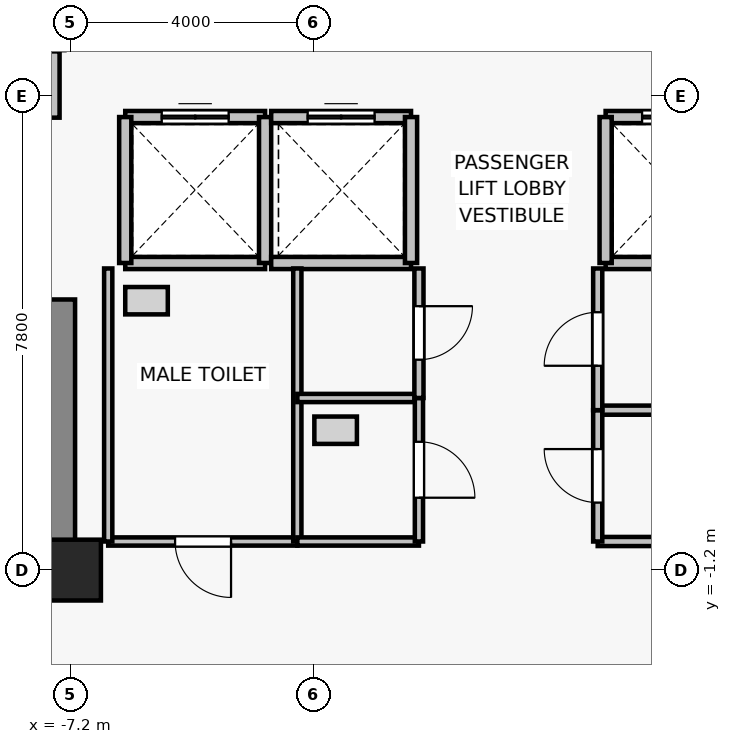
"""IFC4 building model, lengths in metres.
Left out: names, types, materials, properties, quantities, classifications, styles, units other than length and angle.
Written with IfcOpenShell. Run it as: python <this file> out.ifc"""

import sys

from ifc_helpers import new_model, si_unit, direction, frame, frame_2d, origin, origin_2d, place, context, subcontext, project, spatial, rectangle, extrude, source, transform, mapped, element, fill, save


model = new_model("IFC4")
c1 = context("Model", 3, precision=1e-05, world=origin(), true_north=direction((0.0, 1.0)))
c2 = subcontext(c1, "Body", "Model", "MODEL_VIEW")
j1 = project(units=[si_unit("LENGTHUNIT", "METRE"), si_unit("PLANEANGLEUNIT", "RADIAN")], contexts=[c1])
p1 = place(None, origin())
s1 = spatial("IfcSite", under=j1, at=p1, CompositionType="ELEMENT")
p2 = place(p1, origin())
s2 = spatial("IfcBuilding", under=s1, at=p2, CompositionType="ELEMENT")
p3 = place(p2, frame((0.0, 0.0, 195.7)))
s3 = spatial("IfcBuildingStorey", under=s2, at=p3, CompositionType="ELEMENT", Elevation=195.7)
p4 = place(p3, frame((-7.2, -1.2, 0.0), z_axis=(0.0, 0.0, 1.0), x_axis=(1.0, 0.0, 0.0)))
e1 = element("IfcColumn", 1, at=p4, inside=s3, PredefinedType="COLUMN", context=c2, shape_type="SweptSolid", body=[
    extrude(rectangle(XDim=1.0, YDim=1.0, at=origin_2d()), origin(), (0.0, 0.0, 1.0), 3.3),
])
p5 = place(p3, frame((-7.4, -0.825, 0.0), z_axis=(0.0, 0.0, 1.0), x_axis=(0.0, 1.0, 0.0)))
e2 = element("IfcWall", 2, at=p5, inside=s3, PredefinedType="SHEAR", context=c2, shape_type="SweptSolid", body=[
    extrude(rectangle(XDim=4.075, YDim=0.55, at=frame_2d((2.038, 0.0))), origin(), (0.0, 0.0, 1.0), 3.05),
])
p6 = place(p3, frame((-4.0, 3.85, 0.0), z_axis=(0.0, 0.0, 1.0), x_axis=(-1.0, 0.0, 0.0)))
e3 = element("IfcWall", 3, at=p6, inside=s3, PredefinedType="SOLIDWALL", context=c2, shape_type="SweptSolid", body=[
    extrude(rectangle(XDim=2.3, YDim=0.2, at=frame_2d((1.15, 0.0))), origin(), (0.0, 0.0, 1.0), 3.05),
])
p7 = place(p3, frame((-6.3, 6.25, 0.0), z_axis=(0.0, 0.0, 1.0), x_axis=(1.0, 0.0, 0.0)))
e4 = element("IfcWall", 4, at=p7, inside=s3, PredefinedType="SOLIDWALL", context=c2, shape_type="SweptSolid", body=[
    extrude(rectangle(XDim=2.3, YDim=0.2, at=frame_2d((1.15, 0.0))), origin(), (0.0, 0.0, 1.0), 3.05),
])
p8 = place(p7, frame((0.6, 0.0, 0.0)))
e5 = element("IfcOpeningElement", 5, at=p8, cuts=e4, PredefinedType="OPENING", context=c2, shape_type="SweptSolid", body=[
    extrude(rectangle(XDim=1.1, YDim=2.2, at=frame_2d((0.55, 1.1))), frame((0.0, 0.11, 0.0), z_axis=(0.0, -1.0, 0.0), x_axis=(1.0, 0.0, 0.0)), (0.0, 0.0, 1.0), 0.22),
])
for number, where, z_axis, x_axis in (
    (6, (-6.3, 3.85, 0.0), (0.0, 0.0, 1.0), (0.0, 1.0, 0.0)),
    (7, (-4.0, 6.25, 0.0), (0.0, 0.0, 1.0), (0.0, -1.0, 0.0)),
):
    element("IfcWall", number, at=place(p3, frame(where, z_axis=z_axis, x_axis=x_axis)), inside=s3, PredefinedType="SOLIDWALL", context=c2, shape_type="SweptSolid", body=[
        extrude(rectangle(XDim=2.4, YDim=0.2, at=frame_2d((1.2, 0.0))), origin(), (0.0, 0.0, 1.0), 3.05),
    ])
p9 = place(p3, frame((-1.6, 3.85, 0.0), z_axis=(0.0, 0.0, 1.0), x_axis=(-1.0, 0.0, 0.0)))
e8 = element("IfcWall", 8, at=p9, inside=s3, PredefinedType="SOLIDWALL", context=c2, shape_type="SweptSolid", body=[
    extrude(rectangle(XDim=2.3, YDim=0.2, at=frame_2d((1.15, 0.0))), origin(), (0.0, 0.0, 1.0), 3.05),
])
p10 = place(p3, frame((-3.9, 6.25, 0.0), z_axis=(0.0, 0.0, 1.0), x_axis=(1.0, 0.0, 0.0)))
e9 = element("IfcWall", 9, at=p10, inside=s3, PredefinedType="SOLIDWALL", context=c2, shape_type="SweptSolid", body=[
    extrude(rectangle(XDim=2.3, YDim=0.2, at=frame_2d((1.15, 0.0))), origin(), (0.0, 0.0, 1.0), 3.05),
])
p11 = place(p10, frame((0.6, 0.0, 0.0)))
e10 = element("IfcOpeningElement", 10, at=p11, cuts=e9, PredefinedType="OPENING", context=c2, shape_type="SweptSolid", body=[
    extrude(rectangle(XDim=1.1, YDim=2.2, at=frame_2d((0.55, 1.1))), frame((0.0, 0.11, 0.0), z_axis=(0.0, -1.0, 0.0), x_axis=(1.0, 0.0, 0.0)), (0.0, 0.0, 1.0), 0.22),
])
p12 = place(p3, frame((-1.6, 6.25, 0.0), z_axis=(0.0, 0.0, 1.0), x_axis=(0.0, -1.0, 0.0)))
e11 = element("IfcWall", 11, at=p12, inside=s3, PredefinedType="SOLIDWALL", context=c2, shape_type="SweptSolid", body=[
    extrude(rectangle(XDim=2.4, YDim=0.2, at=frame_2d((1.2, 0.0))), origin(), (0.0, 0.0, 1.0), 3.05),
])
p13 = place(p3, frame((3.9, 3.85, 0.0), z_axis=(0.0, 0.0, 1.0), x_axis=(-1.0, 0.0, 0.0)))
e12 = element("IfcWall", 12, at=p13, inside=s3, PredefinedType="SOLIDWALL", context=c2, shape_type="SweptSolid", body=[
    extrude(rectangle(XDim=2.3, YDim=0.2, at=frame_2d((1.15, 0.0))), origin(), (0.0, 0.0, 1.0), 3.05),
])
p14 = place(p3, frame((1.6, 6.25, 0.0), z_axis=(0.0, 0.0, 1.0), x_axis=(1.0, 0.0, 0.0)))
e13 = element("IfcWall", 13, at=p14, inside=s3, PredefinedType="SOLIDWALL", context=c2, shape_type="SweptSolid", body=[
    extrude(rectangle(XDim=2.3, YDim=0.2, at=frame_2d((1.15, 0.0))), origin(), (0.0, 0.0, 1.0), 3.05),
])
p15 = place(p14, frame((0.6, 0.0, 0.0)))
e14 = element("IfcOpeningElement", 14, at=p15, cuts=e13, PredefinedType="OPENING", context=c2, shape_type="SweptSolid", body=[
    extrude(rectangle(XDim=1.1, YDim=2.2, at=frame_2d((0.55, 1.1))), frame((0.0, 0.11, 0.0), z_axis=(0.0, -1.0, 0.0), x_axis=(1.0, 0.0, 0.0)), (0.0, 0.0, 1.0), 0.22),
])
p16 = place(p3, frame((1.6, 3.85, 0.0), z_axis=(0.0, 0.0, 1.0), x_axis=(0.0, 1.0, 0.0)))
e15 = element("IfcWall", 15, at=p16, inside=s3, PredefinedType="SOLIDWALL", context=c2, shape_type="SweptSolid", body=[
    extrude(rectangle(XDim=2.4, YDim=0.2, at=frame_2d((1.2, 0.0))), origin(), (0.0, 0.0, 1.0), 3.05),
])
p17 = place(p3, frame((-7.4, 7.35, 0.0), z_axis=(0.0, 0.0, 1.0), x_axis=(-1.0, 0.0, 0.0)))
e16 = element("IfcWall", 16, at=p17, inside=s3, PredefinedType="SOLIDWALL", context=c2, shape_type="SweptSolid", body=[
    extrude(rectangle(XDim=2.2, YDim=0.2, at=frame_2d((1.1, 0.0))), origin(), (0.0, 0.0, 1.0), 2.54),
])
p18 = place(p3, frame((-7.47, 7.33, 0.0), z_axis=(0.0, 0.0, 1.0), x_axis=(0.0, -1.0, 0.0)))
e17 = element("IfcWall", 17, at=p18, inside=s3, PredefinedType="PARTITIONING", context=c2, shape_type="SweptSolid", body=[
    extrude(rectangle(XDim=1.09, YDim=0.18, at=frame_2d((0.545, 0.0))), origin(), (0.0, 0.0, 1.0), 2.54),
])
p19 = place(p3, frame((-3.47, -0.73, 0.0), z_axis=(0.0, 0.0, 1.0), x_axis=(-1.0, 0.0, 0.0)))
e18 = element("IfcWall", 18, at=p19, inside=s3, PredefinedType="PARTITIONING", context=c2, shape_type="SweptSolid", body=[
    extrude(rectangle(XDim=3.11, YDim=0.135, at=frame_2d((1.555, 0.0))), origin(), (0.0, 0.0, 1.0), 3.05),
])
p20 = place(p19, frame((1.09, 0.0, 0.0)))
e19 = element("IfcOpeningElement", 19, at=p20, cuts=e18, PredefinedType="OPENING", context=c2, shape_type="SweptSolid", body=[
    extrude(rectangle(XDim=0.92, YDim=2.1, at=frame_2d((0.46, 1.05))), frame((0.0, 0.077, 0.0), z_axis=(0.0, -1.0, 0.0), x_axis=(1.0, 0.0, 0.0)), (0.0, 0.0, 1.0), 0.155),
])
for number, where, z_axis, x_axis in (
    (20, (-6.58, -0.73, 0.0), (0.0, 0.0, 1.0), (0.0, 1.0, 0.0)),
    (21, (-3.47, 3.76, 0.0), (0.0, 0.0, 1.0), (0.0, -1.0, 0.0)),
):
    element("IfcWall", number, at=place(p3, frame(where, z_axis=z_axis, x_axis=x_axis)), inside=s3, PredefinedType="PARTITIONING", context=c2, shape_type="SweptSolid", body=[
        extrude(rectangle(XDim=4.49, YDim=0.135, at=frame_2d((2.245, 0.0))), origin(), (0.0, 0.0, 1.0), 3.05),
    ])
for number, where, z_axis, x_axis in (
    (22, (-1.47, -0.73, 0.0), (0.0, 0.0, 1.0), (-1.0, 0.0, 0.0)),
    (23, (-3.47, 1.63, 0.0), (0.0, 0.0, 1.0), (1.0, 0.0, 0.0)),
):
    element("IfcWall", number, at=place(p3, frame(where, z_axis=z_axis, x_axis=x_axis)), inside=s3, PredefinedType="PARTITIONING", context=c2, shape_type="SweptSolid", body=[
        extrude(rectangle(XDim=2.0, YDim=0.135, at=frame_2d((1.0, 0.0))), origin(), (0.0, 0.0, 1.0), 3.05),
    ])
p21 = place(p3, frame((-1.47, 1.63, 0.0), z_axis=(0.0, 0.0, 1.0), x_axis=(0.0, -1.0, 0.0)))
e24 = element("IfcWall", 24, at=p21, inside=s3, PredefinedType="PARTITIONING", context=c2, shape_type="SweptSolid", body=[
    extrude(rectangle(XDim=2.36, YDim=0.135, at=frame_2d((1.18, 0.0))), origin(), (0.0, 0.0, 1.0), 3.05),
])
p22 = place(p21, frame((0.72, 0.0, 0.0)))
e25 = element("IfcOpeningElement", 25, at=p22, cuts=e24, PredefinedType="OPENING", context=c2, shape_type="SweptSolid", body=[
    extrude(rectangle(XDim=0.92, YDim=2.1, at=frame_2d((0.46, 1.05))), frame((0.0, 0.077, 0.0), z_axis=(0.0, -1.0, 0.0), x_axis=(1.0, 0.0, 0.0)), (0.0, 0.0, 1.0), 0.155),
])
p23 = place(p3, frame((-1.47, 3.76, 0.0), z_axis=(0.0, 0.0, 1.0), x_axis=(0.0, -1.0, 0.0)))
e26 = element("IfcWall", 26, at=p23, inside=s3, PredefinedType="PARTITIONING", context=c2, shape_type="SweptSolid", body=[
    extrude(rectangle(XDim=2.13, YDim=0.15, at=frame_2d((1.065, 0.0))), origin(), (0.0, 0.0, 1.0), 3.05),
])
p24 = place(p23, frame((0.62, 0.0, 0.0)))
e27 = element("IfcOpeningElement", 27, at=p24, cuts=e26, PredefinedType="OPENING", context=c2, shape_type="SweptSolid", body=[
    extrude(rectangle(XDim=0.88, YDim=2.1, at=frame_2d((0.44, 1.05))), frame((0.0, 0.085, 0.0), z_axis=(0.0, -1.0, 0.0), x_axis=(1.0, 0.0, 0.0)), (0.0, 0.0, 1.0), 0.17),
])
for number, where, z_axis, x_axis in (
    (28, (3.68, -0.73, 0.0), (0.0, 0.0, 1.0), (-1.0, 0.0, 0.0)),
    (29, (1.47, 1.43, 0.0), (0.0, 0.0, 1.0), (1.0, 0.0, 0.0)),
):
    element("IfcWall", number, at=place(p3, frame(where, z_axis=z_axis, x_axis=x_axis)), inside=s3, PredefinedType="PARTITIONING", context=c2, shape_type="SweptSolid", body=[
        extrude(rectangle(XDim=2.21, YDim=0.15, at=frame_2d((1.105, 0.0))), origin(), (0.0, 0.0, 1.0), 3.05),
    ])
p25 = place(p3, frame((1.47, -0.73, 0.0), z_axis=(0.0, 0.0, 1.0), x_axis=(0.0, 1.0, 0.0)))
e30 = element("IfcWall", 30, at=p25, inside=s3, PredefinedType="PARTITIONING", context=c2, shape_type="SweptSolid", body=[
    extrude(rectangle(XDim=2.16, YDim=0.15, at=frame_2d((1.08, 0.0))), origin(), (0.0, 0.0, 1.0), 3.05),
])
p26 = place(p25, frame((0.64, 0.0, 0.0)))
e31 = element("IfcOpeningElement", 31, at=p26, cuts=e30, PredefinedType="OPENING", context=c2, shape_type="SweptSolid", body=[
    extrude(rectangle(XDim=0.88, YDim=2.1, at=frame_2d((0.44, 1.05))), frame((0.0, 0.085, 0.0), z_axis=(0.0, -1.0, 0.0), x_axis=(1.0, 0.0, 0.0)), (0.0, 0.0, 1.0), 0.17),
])
p27 = place(p3, frame((1.47, 1.43, 0.0), z_axis=(0.0, 0.0, 1.0), x_axis=(0.0, 1.0, 0.0)))
e32 = element("IfcWall", 32, at=p27, inside=s3, PredefinedType="PARTITIONING", context=c2, shape_type="SweptSolid", body=[
    extrude(rectangle(XDim=2.33, YDim=0.15, at=frame_2d((1.165, 0.0))), origin(), (0.0, 0.0, 1.0), 3.05),
])
p28 = place(p27, frame((0.73, 0.0, 0.0)))
e33 = element("IfcOpeningElement", 33, at=p28, cuts=e32, PredefinedType="OPENING", context=c2, shape_type="SweptSolid", body=[
    extrude(rectangle(XDim=0.88, YDim=2.15, at=frame_2d((0.44, 1.075))), frame((0.0, 0.085, 0.0), z_axis=(0.0, -1.0, 0.0), x_axis=(1.0, 0.0, 0.0)), (0.0, 0.0, 1.0), 0.17),
])
m1 = source(origin(), c2, "Body", "SweptSolid", [
    extrude(rectangle(XDim=1.1, YDim=2.2, at=frame_2d((0.55, 1.1))), frame((0.0, 0.025, 0.0), z_axis=(0.0, -1.0, 0.0), x_axis=(1.0, 0.0, 0.0)), (0.0, 0.0, 1.0), 0.05),
])
p29 = place(p8, origin())
e34 = element("IfcDoor", 34, at=p29, inside=s3, OperationType="DOUBLE_DOOR_SLIDING", PredefinedType="DOOR", context=c2, shape_type="MappedRepresentation", body=[
    mapped(m1, transform((0.0, 0.0, 0.0), x_axis=(1.0, 0.0, 0.0), y_axis=(0.0, 1.0, 0.0), z_axis=(0.0, 0.0, 1.0), scale=1.0)),
])
fill(e5, e34)
p30 = place(p11, origin())
e35 = element("IfcDoor", 35, at=p30, inside=s3, OperationType="DOUBLE_DOOR_SLIDING", PredefinedType="DOOR", context=c2, shape_type="MappedRepresentation", body=[
    mapped(m1, transform((0.0, 0.0, 0.0), x_axis=(1.0, 0.0, 0.0), y_axis=(0.0, 1.0, 0.0), z_axis=(0.0, 0.0, 1.0), scale=1.0)),
])
fill(e10, e35)
p31 = place(p15, origin())
e36 = element("IfcDoor", 36, at=p31, inside=s3, OperationType="DOUBLE_DOOR_SLIDING", PredefinedType="DOOR", context=c2, shape_type="MappedRepresentation", body=[
    mapped(m1, transform((0.0, 0.0, 0.0), x_axis=(1.0, 0.0, 0.0), y_axis=(0.0, 1.0, 0.0), z_axis=(0.0, 0.0, 1.0), scale=1.0)),
])
fill(e14, e36)
m2 = source(origin(), c2, "Body", "SweptSolid", [
    extrude(rectangle(XDim=0.92, YDim=2.1, at=frame_2d((0.46, 1.05))), frame((0.0, 0.025, 0.0), z_axis=(0.0, -1.0, 0.0), x_axis=(1.0, 0.0, 0.0)), (0.0, 0.0, 1.0), 0.05),
])
p32 = place(p20, origin())
e37 = element("IfcDoor", 37, at=p32, inside=s3, OperationType="SINGLE_SWING_LEFT", PredefinedType="DOOR", context=c2, shape_type="MappedRepresentation", body=[
    mapped(m2, transform((0.0, 0.0, 0.0), x_axis=(1.0, 0.0, 0.0), y_axis=(0.0, 1.0, 0.0), z_axis=(0.0, 0.0, 1.0), scale=1.0)),
])
fill(e19, e37)
p33 = place(p22, origin())
e38 = element("IfcDoor", 38, at=p33, inside=s3, OperationType="SINGLE_SWING_RIGHT", PredefinedType="DOOR", context=c2, shape_type="MappedRepresentation", body=[
    mapped(m2, transform((0.0, 0.0, 0.0), x_axis=(1.0, 0.0, 0.0), y_axis=(0.0, 1.0, 0.0), z_axis=(0.0, 0.0, 1.0), scale=1.0)),
])
fill(e25, e38)
m3 = source(origin(), c2, "Body", "SweptSolid", [
    extrude(rectangle(XDim=0.88, YDim=2.1, at=frame_2d((0.44, 1.05))), frame((0.0, 0.025, 0.0), z_axis=(0.0, -1.0, 0.0), x_axis=(1.0, 0.0, 0.0)), (0.0, 0.0, 1.0), 0.05),
])
p34 = place(p24, origin())
e39 = element("IfcDoor", 39, at=p34, inside=s3, OperationType="SINGLE_SWING_LEFT", PredefinedType="DOOR", context=c2, shape_type="MappedRepresentation", body=[
    mapped(m3, transform((0.0, 0.0, 0.0), x_axis=(1.0, 0.0, 0.0), y_axis=(0.0, 1.0, 0.0), z_axis=(0.0, 0.0, 1.0), scale=1.0)),
])
fill(e27, e39)
p35 = place(p26, origin())
e40 = element("IfcDoor", 40, at=p35, inside=s3, OperationType="SINGLE_SWING_RIGHT", PredefinedType="DOOR", context=c2, shape_type="MappedRepresentation", body=[
    mapped(m3, transform((0.0, 0.0, 0.0), x_axis=(1.0, 0.0, 0.0), y_axis=(0.0, 1.0, 0.0), z_axis=(0.0, 0.0, 1.0), scale=1.0)),
])
fill(e31, e40)
m4 = source(origin(), c2, "Body", "SweptSolid", [
    extrude(rectangle(XDim=0.88, YDim=2.15, at=frame_2d((0.44, 1.075))), frame((0.0, 0.025, 0.0), z_axis=(0.0, -1.0, 0.0), x_axis=(1.0, 0.0, 0.0)), (0.0, 0.0, 1.0), 0.05),
])
p36 = place(p28, origin())
e41 = element("IfcDoor", 41, at=p36, inside=s3, OperationType="SINGLE_SWING_LEFT", PredefinedType="DOOR", context=c2, shape_type="MappedRepresentation", body=[
    mapped(m4, transform((0.0, 0.0, 0.0), x_axis=(1.0, 0.0, 0.0), y_axis=(0.0, 1.0, 0.0), z_axis=(0.0, 0.0, 1.0), scale=1.0)),
])
fill(e33, e41)
save(model, sys.argv[1])
